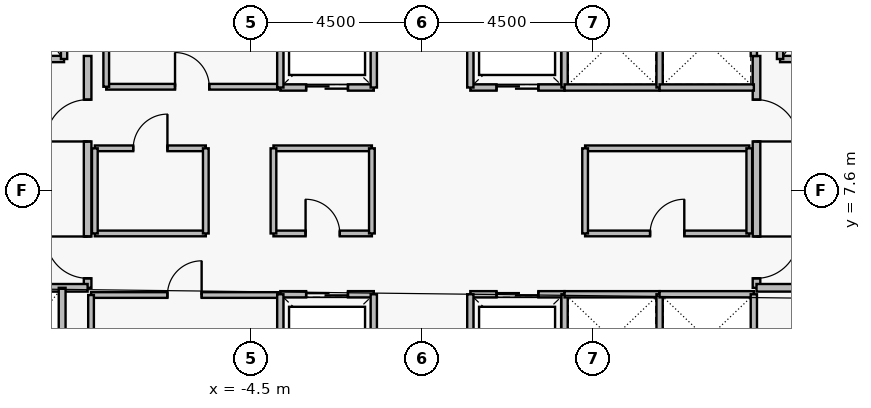
"""IFC4 building model, lengths in metres.
Left out: names, types, materials, properties, quantities, classifications, styles, units other than length and angle.
Written with IfcOpenShell. Run it as: python <this file> out.ifc"""

import sys

from ifc_helpers import new_model, si_unit, direction, frame, frame_2d, origin, place, context, subcontext, project, spatial, rectangle, extrude, element, fill, save


model = new_model("IFC4")
c1 = context("Model", 3, precision=1e-05, world=origin(), true_north=direction((0.0, 1.0)))
c2 = subcontext(c1, "Body", "Model", "MODEL_VIEW")
j1 = project(units=[si_unit("LENGTHUNIT", "METRE"), si_unit("PLANEANGLEUNIT", "RADIAN")], contexts=[c1])
p1 = place(None, origin())
s1 = spatial("IfcSite", under=j1, at=p1, CompositionType="ELEMENT")
p2 = place(p1, origin())
s2 = spatial("IfcBuilding", under=s1, at=p2, CompositionType="ELEMENT")
p3 = place(p2, frame((0.0, 0.0, 181.15)))
s3 = spatial("IfcBuildingStorey", under=s2, at=p3, CompositionType="ELEMENT", Elevation=181.15)
p4 = place(p3, frame((-8.8, 5.05, 0.0), z_axis=(0.0, 0.0, 1.0), x_axis=(0.0, 1.0, 0.0)))
e1 = element("IfcWall", 1, at=p4, inside=s3, PredefinedType="PARTITIONING", context=c2, shape_type="SweptSolid", body=[
    extrude(rectangle(XDim=6.1, YDim=0.2, at=frame_2d((3.05, 0.0))), origin(), (0.0, 0.0, 1.0), 3.53),
])
p5 = place(p4, frame((0.25, 0.0, 0.0)))
e2 = element("IfcOpeningElement", 2, at=p5, cuts=e1, PredefinedType="OPENING", context=c2, shape_type="SweptSolid", body=[
    extrude(rectangle(XDim=1.1, YDim=2.2, at=frame_2d((0.55, 1.1))), frame((0.0, 0.11, 0.0), z_axis=(0.0, -1.0, 0.0), x_axis=(1.0, 0.0, 0.0)), (0.0, 0.0, 1.0), 0.22),
])
p6 = place(p4, frame((3.85, 0.0, 0.0)))
e3 = element("IfcOpeningElement", 3, at=p6, cuts=e1, PredefinedType="OPENING", context=c2, shape_type="SweptSolid", body=[
    extrude(rectangle(XDim=1.1, YDim=2.2, at=frame_2d((0.55, 1.1))), frame((0.0, 0.11, 0.0), z_axis=(0.0, -1.0, 0.0), x_axis=(1.0, 0.0, 0.0)), (0.0, 0.0, 1.0), 0.22),
])
p7 = place(p3, frame((8.8, 11.15, 0.0), z_axis=(0.0, 0.0, 1.0), x_axis=(0.0, -1.0, 0.0)))
e4 = element("IfcWall", 4, at=p7, inside=s3, PredefinedType="PARTITIONING", context=c2, shape_type="SweptSolid", body=[
    extrude(rectangle(XDim=6.1, YDim=0.2, at=frame_2d((3.05, 0.0))), origin(), (0.0, 0.0, 1.0), 3.53),
])
p8 = place(p7, frame((1.15, 0.0, 0.0)))
e5 = element("IfcOpeningElement", 5, at=p8, cuts=e4, PredefinedType="OPENING", context=c2, shape_type="SweptSolid", body=[
    extrude(rectangle(XDim=1.1, YDim=2.2, at=frame_2d((0.55, 1.1))), frame((0.0, 0.11, 0.0), z_axis=(0.0, -1.0, 0.0), x_axis=(1.0, 0.0, 0.0)), (0.0, 0.0, 1.0), 0.22),
])
p9 = place(p7, frame((4.75, 0.0, 0.0)))
e6 = element("IfcOpeningElement", 6, at=p9, cuts=e4, PredefinedType="OPENING", context=c2, shape_type="SweptSolid", body=[
    extrude(rectangle(XDim=1.1, YDim=2.2, at=frame_2d((0.55, 1.1))), frame((0.0, 0.11, 0.0), z_axis=(0.0, -1.0, 0.0), x_axis=(1.0, 0.0, 0.0)), (0.0, 0.0, 1.0), 0.22),
])
p10 = place(p3, frame((-11.58, 11.07, 0.0), z_axis=(0.0, 0.0, 1.0), x_axis=(1.0, 0.0, 0.0)))
e7 = element("IfcWall", 7, at=p10, inside=s3, PredefinedType="PARTITIONING", context=c2, shape_type="SweptSolid", body=[
    extrude(rectangle(XDim=2.16, YDim=0.165, at=frame_2d((1.08, 0.0))), origin(), (0.0, 0.0, 1.0), 3.53),
])
p11 = place(p10, frame((0.53, 0.0, 0.0)))
e8 = element("IfcOpeningElement", 8, at=p11, cuts=e7, PredefinedType="OPENING", context=c2, shape_type="SweptSolid", body=[
    extrude(rectangle(XDim=1.15, YDim=2.25, at=frame_2d((0.575, 1.125))), frame((0.0, 0.093, 0.0), z_axis=(0.0, -1.0, 0.0), x_axis=(1.0, 0.0, 0.0)), (0.0, 0.0, 1.0), 0.185),
])
p12 = place(p3, frame((9.42, 11.07, 0.0), z_axis=(0.0, 0.0, 1.0), x_axis=(1.0, 0.0, 0.0)))
e9 = element("IfcWall", 9, at=p12, inside=s3, PredefinedType="PARTITIONING", context=c2, shape_type="SweptSolid", body=[
    extrude(rectangle(XDim=2.16, YDim=0.165, at=frame_2d((1.08, 0.0))), origin(), (0.0, 0.0, 1.0), 3.53),
])
p13 = place(p12, frame((0.53, 0.0, 0.0)))
e10 = element("IfcOpeningElement", 10, at=p13, cuts=e9, PredefinedType="OPENING", context=c2, shape_type="SweptSolid", body=[
    extrude(rectangle(XDim=1.15, YDim=2.25, at=frame_2d((0.575, 1.125))), frame((0.0, 0.093, 0.0), z_axis=(0.0, -1.0, 0.0), x_axis=(1.0, 0.0, 0.0)), (0.0, 0.0, 1.0), 0.185),
])
p14 = place(p3, frame((-3.73, 4.88, 0.0), z_axis=(0.0, 0.0, 1.0), x_axis=(1.0, 0.0, 0.0)))
e11 = element("IfcWall", 11, at=p14, inside=s3, PredefinedType="PARTITIONING", context=c2, shape_type="SweptSolid", body=[
    extrude(rectangle(XDim=2.46, YDim=0.165, at=frame_2d((1.23, 0.0))), origin(), (0.0, 0.0, 1.0), 3.53),
])
p15 = place(p14, frame((0.68, 0.0, 0.0)))
e12 = element("IfcOpeningElement", 12, at=p15, cuts=e11, PredefinedType="OPENING", context=c2, shape_type="SweptSolid", body=[
    extrude(rectangle(XDim=1.1, YDim=2.25, at=frame_2d((0.55, 1.125))), frame((0.0, 0.093, 0.0), z_axis=(0.0, -1.0, 0.0), x_axis=(1.0, 0.0, 0.0)), (0.0, 0.0, 1.0), 0.185),
])
p16 = place(p3, frame((1.27, 4.88, 0.0), z_axis=(0.0, 0.0, 1.0), x_axis=(1.0, 0.0, 0.0)))
e13 = element("IfcWall", 13, at=p16, inside=s3, PredefinedType="PARTITIONING", context=c2, shape_type="SweptSolid", body=[
    extrude(rectangle(XDim=2.48, YDim=0.165, at=frame_2d((1.24, 0.0))), origin(), (0.0, 0.0, 1.0), 3.53),
])
p17 = place(p16, frame((0.69, 0.0, 0.0)))
e14 = element("IfcOpeningElement", 14, at=p17, cuts=e13, PredefinedType="OPENING", context=c2, shape_type="SweptSolid", body=[
    extrude(rectangle(XDim=1.1, YDim=2.25, at=frame_2d((0.55, 1.125))), frame((0.0, 0.093, 0.0), z_axis=(0.0, -1.0, 0.0), x_axis=(1.0, 0.0, 0.0)), (0.0, 0.0, 1.0), 0.185),
])
p18 = place(p3, frame((-3.73, 10.32, 0.0), z_axis=(0.0, 0.0, 1.0), x_axis=(1.0, 0.0, 0.0)))
e15 = element("IfcWall", 15, at=p18, inside=s3, PredefinedType="PARTITIONING", context=c2, shape_type="SweptSolid", body=[
    extrude(rectangle(XDim=2.46, YDim=0.165, at=frame_2d((1.23, 0.0))), origin(), (0.0, 0.0, 1.0), 3.53),
])
p19 = place(p18, frame((0.68, 0.0, 0.0)))
e16 = element("IfcOpeningElement", 16, at=p19, cuts=e15, PredefinedType="OPENING", context=c2, shape_type="SweptSolid", body=[
    extrude(rectangle(XDim=1.1, YDim=2.25, at=frame_2d((0.55, 1.125))), frame((0.0, 0.093, 0.0), z_axis=(0.0, -1.0, 0.0), x_axis=(1.0, 0.0, 0.0)), (0.0, 0.0, 1.0), 0.185),
])
p20 = place(p3, frame((1.27, 10.32, 0.0), z_axis=(0.0, 0.0, 1.0), x_axis=(1.0, 0.0, 0.0)))
e17 = element("IfcWall", 17, at=p20, inside=s3, PredefinedType="PARTITIONING", context=c2, shape_type="SweptSolid", body=[
    extrude(rectangle(XDim=2.48, YDim=0.165, at=frame_2d((1.24, 0.0))), origin(), (0.0, 0.0, 1.0), 3.53),
])
p21 = place(p20, frame((0.69, 0.0, 0.0)))
e18 = element("IfcOpeningElement", 18, at=p21, cuts=e17, PredefinedType="OPENING", context=c2, shape_type="SweptSolid", body=[
    extrude(rectangle(XDim=1.1, YDim=2.25, at=frame_2d((0.55, 1.125))), frame((0.0, 0.093, 0.0), z_axis=(0.0, -1.0, 0.0), x_axis=(1.0, 0.0, 0.0)), (0.0, 0.0, 1.0), 0.185),
])
p22 = place(p3, frame((-8.71, 4.86, 0.0), z_axis=(0.0, 0.0, 1.0), x_axis=(1.0, 0.0, 0.0)))
e19 = element("IfcWall", 19, at=p22, inside=s3, PredefinedType="PARTITIONING", context=c2, shape_type="SweptSolid", body=[
    extrude(rectangle(XDim=4.92, YDim=0.15, at=frame_2d((2.46, 0.0))), origin(), (0.0, 0.0, 1.0), 3.53),
])
p23 = place(p22, frame((2.01, 0.0, 0.0)))
e20 = element("IfcOpeningElement", 20, at=p23, cuts=e19, PredefinedType="OPENING", context=c2, shape_type="SweptSolid", body=[
    extrude(rectangle(XDim=0.9, YDim=2.15, at=frame_2d((0.45, 1.075))), frame((0.0, 0.085, 0.0), z_axis=(0.0, -1.0, 0.0), x_axis=(1.0, 0.0, 0.0)), (0.0, 0.0, 1.0), 0.17),
])
p24 = place(p3, frame((-8.31, 10.34, 0.0), z_axis=(0.0, 0.0, 1.0), x_axis=(1.0, 0.0, 0.0)))
e21 = element("IfcWall", 21, at=p24, inside=s3, PredefinedType="PARTITIONING", context=c2, shape_type="SweptSolid", body=[
    extrude(rectangle(XDim=4.52, YDim=0.15, at=frame_2d((2.26, 0.0))), origin(), (0.0, 0.0, 1.0), 3.53),
])
p25 = place(p24, frame((1.81, 0.0, 0.0)))
e22 = element("IfcOpeningElement", 22, at=p25, cuts=e21, PredefinedType="OPENING", context=c2, shape_type="SweptSolid", body=[
    extrude(rectangle(XDim=0.9, YDim=2.15, at=frame_2d((0.45, 1.075))), frame((0.0, 0.085, 0.0), z_axis=(0.0, -1.0, 0.0), x_axis=(1.0, 0.0, 0.0)), (0.0, 0.0, 1.0), 0.17),
])
p26 = place(p3, frame((-8.61, 8.72, 0.0), z_axis=(0.0, 0.0, 1.0), x_axis=(1.0, 0.0, 0.0)))
e23 = element("IfcWall", 23, at=p26, inside=s3, PredefinedType="PARTITIONING", context=c2, shape_type="SweptSolid", body=[
    extrude(rectangle(XDim=2.92, YDim=0.15, at=frame_2d((1.46, 0.0))), origin(), (0.0, 0.0, 1.0), 3.53),
])
p27 = place(p26, frame((1.01, 0.0, 0.0)))
e24 = element("IfcOpeningElement", 24, at=p27, cuts=e23, PredefinedType="OPENING", context=c2, shape_type="SweptSolid", body=[
    extrude(rectangle(XDim=0.9, YDim=2.15, at=frame_2d((0.45, 1.075))), frame((0.0, 0.085, 0.0), z_axis=(0.0, -1.0, 0.0), x_axis=(1.0, 0.0, 0.0)), (0.0, 0.0, 1.0), 0.17),
])
p28 = place(p3, frame((-3.91, 6.48, 0.0), z_axis=(0.0, 0.0, 1.0), x_axis=(1.0, 0.0, 0.0)))
e25 = element("IfcWall", 25, at=p28, inside=s3, PredefinedType="PARTITIONING", context=c2, shape_type="SweptSolid", body=[
    extrude(rectangle(XDim=2.59, YDim=0.15, at=frame_2d((1.295, 0.0))), origin(), (0.0, 0.0, 1.0), 3.53),
])
p29 = place(p28, frame((0.845, 0.0, 0.0)))
e26 = element("IfcOpeningElement", 26, at=p29, cuts=e25, PredefinedType="OPENING", context=c2, shape_type="SweptSolid", body=[
    extrude(rectangle(XDim=0.9, YDim=2.15, at=frame_2d((0.45, 1.075))), frame((0.0, 0.085, 0.0), z_axis=(0.0, -1.0, 0.0), x_axis=(1.0, 0.0, 0.0)), (0.0, 0.0, 1.0), 0.17),
])
p30 = place(p3, frame((4.29, 6.48, 0.0), z_axis=(0.0, 0.0, 1.0), x_axis=(1.0, 0.0, 0.0)))
e27 = element("IfcWall", 27, at=p30, inside=s3, PredefinedType="PARTITIONING", context=c2, shape_type="SweptSolid", body=[
    extrude(rectangle(XDim=4.32, YDim=0.15, at=frame_2d((2.16, 0.0))), origin(), (0.0, 0.0, 1.0), 3.53),
])
p31 = place(p30, frame((1.71, 0.0, 0.0)))
e28 = element("IfcOpeningElement", 28, at=p31, cuts=e27, PredefinedType="OPENING", context=c2, shape_type="SweptSolid", body=[
    extrude(rectangle(XDim=0.9, YDim=2.15, at=frame_2d((0.45, 1.075))), frame((0.0, 0.085, 0.0), z_axis=(0.0, -1.0, 0.0), x_axis=(1.0, 0.0, 0.0)), (0.0, 0.0, 1.0), 0.17),
])
for number, where, z_axis, x_axis in (
    (29, (-11.65, 5.05, 0.0), (0.0, 0.0, 1.0), (1.0, 0.0, 0.0)),
    (30, (8.8, 5.05, 0.0), (0.0, 0.0, 1.0), (1.0, 0.0, 0.0)),
):
    element("IfcWall", number, at=place(p3, frame(where, z_axis=z_axis, x_axis=x_axis)), inside=s3, PredefinedType="PARTITIONING", context=c2, shape_type="SweptSolid", body=[
        extrude(rectangle(XDim=2.85, YDim=0.2, at=frame_2d((1.425, 0.0))), origin(), (0.0, 0.0, 1.0), 3.53),
    ])
for number, where, z_axis, x_axis in (
    (31, (-9.42, 11.07, 0.0), (0.0, 0.0, 1.0), (0.0, 1.0, 0.0)),
    (32, (9.42, 11.07, 0.0), (0.0, 0.0, 1.0), (0.0, 1.0, 0.0)),
):
    element("IfcWall", number, at=place(p3, frame(where, z_axis=z_axis, x_axis=x_axis)), inside=s3, PredefinedType="PARTITIONING", context=c2, shape_type="SweptSolid", body=[
        extrude(rectangle(XDim=2.96, YDim=0.165, at=frame_2d((1.48, 0.0))), origin(), (0.0, 0.0, 1.0), 3.53),
    ])
for number, where, z_axis, x_axis in (
    (33, (-3.73, 2.52, 0.0), (0.0, 0.0, 1.0), (0.0, 1.0, 0.0)),
    (34, (-1.27, 2.52, 0.0), (0.0, 0.0, 1.0), (0.0, 1.0, 0.0)),
    (35, (1.27, 2.52, 0.0), (0.0, 0.0, 1.0), (0.0, 1.0, 0.0)),
    (36, (3.75, 2.52, 0.0), (0.0, 0.0, 1.0), (0.0, 1.0, 0.0)),
    (37, (-3.73, 10.32, 0.0), (0.0, 0.0, 1.0), (0.0, 1.0, 0.0)),
    (38, (-1.27, 10.32, 0.0), (0.0, 0.0, 1.0), (0.0, 1.0, 0.0)),
    (39, (1.27, 10.32, 0.0), (0.0, 0.0, 1.0), (0.0, 1.0, 0.0)),
    (40, (3.75, 10.32, 0.0), (0.0, 0.0, 1.0), (0.0, 1.0, 0.0)),
):
    element("IfcWall", number, at=place(p3, frame(where, z_axis=z_axis, x_axis=x_axis)), inside=s3, PredefinedType="PARTITIONING", context=c2, shape_type="SweptSolid", body=[
        extrude(rectangle(XDim=2.36, YDim=0.165, at=frame_2d((1.18, 0.0))), origin(), (0.0, 0.0, 1.0), 3.53),
    ])
p32 = place(p3, frame((3.75, 4.88, 0.0), z_axis=(0.0, 0.0, 1.0), x_axis=(1.0, 0.0, 0.0)))
e41 = element("IfcWall", 41, at=p32, inside=s3, PredefinedType="PARTITIONING", context=c2, shape_type="SweptSolid", body=[
    extrude(rectangle(XDim=2.5, YDim=0.165, at=frame_2d((1.25, 0.0))), origin(), (0.0, 0.0, 1.0), 3.53),
])
p33 = place(p3, frame((6.25, 2.52, 0.0), z_axis=(0.0, 0.0, 1.0), x_axis=(0.0, 1.0, 0.0)))
e42 = element("IfcWall", 42, at=p33, inside=s3, PredefinedType="PARTITIONING", context=c2, shape_type="SweptSolid", body=[
    extrude(rectangle(XDim=2.36, YDim=0.165, at=frame_2d((1.18, 0.0))), origin(), (0.0, 0.0, 1.0), 3.53),
])
p34 = place(p3, frame((6.25, 4.88, 0.0), z_axis=(0.0, 0.0, 1.0), x_axis=(1.0, 0.0, 0.0)))
e43 = element("IfcWall", 43, at=p34, inside=s3, PredefinedType="PARTITIONING", context=c2, shape_type="SweptSolid", body=[
    extrude(rectangle(XDim=2.48, YDim=0.165, at=frame_2d((1.24, 0.0))), origin(), (0.0, 0.0, 1.0), 3.53),
])
p35 = place(p3, frame((8.73, 2.52, 0.0), z_axis=(0.0, 0.0, 1.0), x_axis=(0.0, 1.0, 0.0)))
e44 = element("IfcWall", 44, at=p35, inside=s3, PredefinedType="PARTITIONING", context=c2, shape_type="SweptSolid", body=[
    extrude(rectangle(XDim=2.36, YDim=0.165, at=frame_2d((1.18, 0.0))), origin(), (0.0, 0.0, 1.0), 3.53),
])
p36 = place(p3, frame((3.75, 10.32, 0.0), z_axis=(0.0, 0.0, 1.0), x_axis=(1.0, 0.0, 0.0)))
e45 = element("IfcWall", 45, at=p36, inside=s3, PredefinedType="PARTITIONING", context=c2, shape_type="SweptSolid", body=[
    extrude(rectangle(XDim=2.5, YDim=0.165, at=frame_2d((1.25, 0.0))), origin(), (0.0, 0.0, 1.0), 3.53),
])
p37 = place(p3, frame((6.25, 10.32, 0.0), z_axis=(0.0, 0.0, 1.0), x_axis=(0.0, 1.0, 0.0)))
e46 = element("IfcWall", 46, at=p37, inside=s3, PredefinedType="PARTITIONING", context=c2, shape_type="SweptSolid", body=[
    extrude(rectangle(XDim=2.36, YDim=0.165, at=frame_2d((1.18, 0.0))), origin(), (0.0, 0.0, 1.0), 3.53),
])
p38 = place(p3, frame((6.25, 10.32, 0.0), z_axis=(0.0, 0.0, 1.0), x_axis=(1.0, 0.0, 0.0)))
e47 = element("IfcWall", 47, at=p38, inside=s3, PredefinedType="PARTITIONING", context=c2, shape_type="SweptSolid", body=[
    extrude(rectangle(XDim=2.48, YDim=0.165, at=frame_2d((1.24, 0.0))), origin(), (0.0, 0.0, 1.0), 3.53),
])
p39 = place(p3, frame((8.73, 11.15, 0.0), z_axis=(0.0, 0.0, 1.0), x_axis=(0.0, 1.0, 0.0)))
e48 = element("IfcWall", 48, at=p39, inside=s3, PredefinedType="PARTITIONING", context=c2, shape_type="SweptSolid", body=[
    extrude(rectangle(XDim=1.53, YDim=0.165, at=frame_2d((0.765, 0.0))), origin(), (0.0, 0.0, 1.0), 3.53),
])
p40 = place(p3, frame((-8.71, 2.49, 0.0), z_axis=(0.0, 0.0, 1.0), x_axis=(0.0, 1.0, 0.0)))
e49 = element("IfcWall", 49, at=p40, inside=s3, PredefinedType="PARTITIONING", context=c2, shape_type="SweptSolid", body=[
    extrude(rectangle(XDim=2.37, YDim=0.15, at=frame_2d((1.185, 0.0))), origin(), (0.0, 0.0, 1.0), 3.53),
])
p41 = place(p3, frame((-8.31, 10.34, 0.0), z_axis=(0.0, 0.0, 1.0), x_axis=(0.0, 1.0, 0.0)))
e50 = element("IfcWall", 50, at=p41, inside=s3, PredefinedType="PARTITIONING", context=c2, shape_type="SweptSolid", body=[
    extrude(rectangle(XDim=2.52, YDim=0.15, at=frame_2d((1.26, 0.0))), origin(), (0.0, 0.0, 1.0), 3.53),
])
p42 = place(p3, frame((-9.47, 2.45, 0.0), z_axis=(0.0, 0.0, 1.0), x_axis=(0.0, 1.0, 0.0)))
e51 = element("IfcWall", 51, at=p42, inside=s3, PredefinedType="PARTITIONING", context=c2, shape_type="SweptSolid", body=[
    extrude(rectangle(XDim=2.6, YDim=0.18, at=frame_2d((1.3, 0.0))), origin(), (0.0, 0.0, 1.0), 3.53),
])
p43 = place(p3, frame((-8.61, 6.48, 0.0), z_axis=(0.0, 0.0, 1.0), x_axis=(1.0, 0.0, 0.0)))
e52 = element("IfcWall", 52, at=p43, inside=s3, PredefinedType="PARTITIONING", context=c2, shape_type="SweptSolid", body=[
    extrude(rectangle(XDim=2.92, YDim=0.15, at=frame_2d((1.46, 0.0))), origin(), (0.0, 0.0, 1.0), 3.53),
])
for number, where, z_axis, x_axis in (
    (53, (-8.61, 6.48, 0.0), (0.0, 0.0, 1.0), (0.0, 1.0, 0.0)),
    (54, (-5.69, 6.48, 0.0), (0.0, 0.0, 1.0), (0.0, 1.0, 0.0)),
):
    element("IfcWall", number, at=place(p3, frame(where, z_axis=z_axis, x_axis=x_axis)), inside=s3, PredefinedType="PARTITIONING", context=c2, shape_type="SweptSolid", body=[
        extrude(rectangle(XDim=2.24, YDim=0.15, at=frame_2d((1.12, 0.0))), origin(), (0.0, 0.0, 1.0), 3.53),
    ])
p44 = place(p3, frame((-3.91, 8.72, 0.0), z_axis=(0.0, 0.0, 1.0), x_axis=(1.0, 0.0, 0.0)))
e55 = element("IfcWall", 55, at=p44, inside=s3, PredefinedType="PARTITIONING", context=c2, shape_type="SweptSolid", body=[
    extrude(rectangle(XDim=2.59, YDim=0.15, at=frame_2d((1.295, 0.0))), origin(), (0.0, 0.0, 1.0), 3.53),
])
for number, where, z_axis, x_axis in (
    (56, (-3.91, 6.48, 0.0), (0.0, 0.0, 1.0), (0.0, 1.0, 0.0)),
    (57, (-1.32, 6.48, 0.0), (0.0, 0.0, 1.0), (0.0, 1.0, 0.0)),
):
    element("IfcWall", number, at=place(p3, frame(where, z_axis=z_axis, x_axis=x_axis)), inside=s3, PredefinedType="PARTITIONING", context=c2, shape_type="SweptSolid", body=[
        extrude(rectangle(XDim=2.24, YDim=0.15, at=frame_2d((1.12, 0.0))), origin(), (0.0, 0.0, 1.0), 3.53),
    ])
p45 = place(p3, frame((4.29, 8.72, 0.0), z_axis=(0.0, 0.0, 1.0), x_axis=(1.0, 0.0, 0.0)))
e58 = element("IfcWall", 58, at=p45, inside=s3, PredefinedType="PARTITIONING", context=c2, shape_type="SweptSolid", body=[
    extrude(rectangle(XDim=4.32, YDim=0.15, at=frame_2d((2.16, 0.0))), origin(), (0.0, 0.0, 1.0), 3.53),
])
for number, where, z_axis, x_axis in (
    (59, (4.29, 6.48, 0.0), (0.0, 0.0, 1.0), (0.0, 1.0, 0.0)),
    (60, (8.61, 6.48, 0.0), (0.0, 0.0, 1.0), (0.0, 1.0, 0.0)),
):
    element("IfcWall", number, at=place(p3, frame(where, z_axis=z_axis, x_axis=x_axis)), inside=s3, PredefinedType="PARTITIONING", context=c2, shape_type="SweptSolid", body=[
        extrude(rectangle(XDim=2.24, YDim=0.15, at=frame_2d((1.12, 0.0))), origin(), (0.0, 0.0, 1.0), 3.53),
    ])
p46 = place(p5, origin())
e61 = element("IfcDoor", 61, at=p46, inside=s3, OperationType="SINGLE_SWING_RIGHT", PredefinedType="DOOR", context=c2, shape_type="SweptSolid", body=[
    extrude(rectangle(XDim=1.1, YDim=2.2, at=frame_2d((0.55, 1.1))), frame((0.0, 0.025, 0.0), z_axis=(0.0, -1.0, 0.0), x_axis=(1.0, 0.0, 0.0)), (0.0, 0.0, 1.0), 0.05),
])
fill(e2, e61)
p47 = place(p6, origin())
e62 = element("IfcDoor", 62, at=p47, inside=s3, OperationType="SINGLE_SWING_LEFT", PredefinedType="DOOR", context=c2, shape_type="SweptSolid", body=[
    extrude(rectangle(XDim=1.1, YDim=2.2, at=frame_2d((0.55, 1.1))), frame((0.0, 0.025, 0.0), z_axis=(0.0, -1.0, 0.0), x_axis=(1.0, 0.0, 0.0)), (0.0, 0.0, 1.0), 0.05),
])
fill(e3, e62)
p48 = place(p8, origin())
e63 = element("IfcDoor", 63, at=p48, inside=s3, OperationType="SINGLE_SWING_RIGHT", PredefinedType="DOOR", context=c2, shape_type="SweptSolid", body=[
    extrude(rectangle(XDim=1.1, YDim=2.2, at=frame_2d((0.55, 1.1))), frame((0.0, 0.025, 0.0), z_axis=(0.0, -1.0, 0.0), x_axis=(1.0, 0.0, 0.0)), (0.0, 0.0, 1.0), 0.05),
])
fill(e5, e63)
p49 = place(p9, origin())
e64 = element("IfcDoor", 64, at=p49, inside=s3, OperationType="SINGLE_SWING_LEFT", PredefinedType="DOOR", context=c2, shape_type="SweptSolid", body=[
    extrude(rectangle(XDim=1.1, YDim=2.2, at=frame_2d((0.55, 1.1))), frame((0.0, 0.025, 0.0), z_axis=(0.0, -1.0, 0.0), x_axis=(1.0, 0.0, 0.0)), (0.0, 0.0, 1.0), 0.05),
])
fill(e6, e64)
p50 = place(p15, origin())
e65 = element("IfcDoor", 65, at=p50, inside=s3, OperationType="SLIDING_TO_LEFT", PredefinedType="DOOR", context=c2, shape_type="SweptSolid", body=[
    extrude(rectangle(XDim=1.1, YDim=2.25, at=frame_2d((0.55, 1.125))), frame((0.0, 0.025, 0.0), z_axis=(0.0, -1.0, 0.0), x_axis=(1.0, 0.0, 0.0)), (0.0, 0.0, 1.0), 0.05),
])
fill(e12, e65)
p51 = place(p17, origin())
e66 = element("IfcDoor", 66, at=p51, inside=s3, OperationType="SLIDING_TO_LEFT", PredefinedType="DOOR", context=c2, shape_type="SweptSolid", body=[
    extrude(rectangle(XDim=1.1, YDim=2.25, at=frame_2d((0.55, 1.125))), frame((0.0, 0.025, 0.0), z_axis=(0.0, -1.0, 0.0), x_axis=(1.0, 0.0, 0.0)), (0.0, 0.0, 1.0), 0.05),
])
fill(e14, e66)
p52 = place(p19, origin())
e67 = element("IfcDoor", 67, at=p52, inside=s3, OperationType="SLIDING_TO_LEFT", PredefinedType="DOOR", context=c2, shape_type="SweptSolid", body=[
    extrude(rectangle(XDim=1.1, YDim=2.25, at=frame_2d((0.55, 1.125))), frame((0.0, 0.025, 0.0), z_axis=(0.0, -1.0, 0.0), x_axis=(1.0, 0.0, 0.0)), (0.0, 0.0, 1.0), 0.05),
])
fill(e16, e67)
p53 = place(p21, origin())
e68 = element("IfcDoor", 68, at=p53, inside=s3, OperationType="SLIDING_TO_LEFT", PredefinedType="DOOR", context=c2, shape_type="SweptSolid", body=[
    extrude(rectangle(XDim=1.1, YDim=2.25, at=frame_2d((0.55, 1.125))), frame((0.0, 0.025, 0.0), z_axis=(0.0, -1.0, 0.0), x_axis=(1.0, 0.0, 0.0)), (0.0, 0.0, 1.0), 0.05),
])
fill(e18, e68)
p54 = place(p23, origin())
e69 = element("IfcDoor", 69, at=p54, inside=s3, OperationType="SINGLE_SWING_RIGHT", PredefinedType="DOOR", context=c2, shape_type="SweptSolid", body=[
    extrude(rectangle(XDim=0.9, YDim=2.15, at=frame_2d((0.45, 1.075))), frame((0.0, 0.025, 0.0), z_axis=(0.0, -1.0, 0.0), x_axis=(1.0, 0.0, 0.0)), (0.0, 0.0, 1.0), 0.05),
])
fill(e20, e69)
p55 = place(p25, origin())
e70 = element("IfcDoor", 70, at=p55, inside=s3, OperationType="SINGLE_SWING_LEFT", PredefinedType="DOOR", context=c2, shape_type="SweptSolid", body=[
    extrude(rectangle(XDim=0.9, YDim=2.15, at=frame_2d((0.45, 1.075))), frame((0.0, 0.025, 0.0), z_axis=(0.0, -1.0, 0.0), x_axis=(1.0, 0.0, 0.0)), (0.0, 0.0, 1.0), 0.05),
])
fill(e22, e70)
p56 = place(p27, origin())
e71 = element("IfcDoor", 71, at=p56, inside=s3, OperationType="SINGLE_SWING_RIGHT", PredefinedType="DOOR", context=c2, shape_type="SweptSolid", body=[
    extrude(rectangle(XDim=0.9, YDim=2.15, at=frame_2d((0.45, 1.075))), frame((0.0, 0.025, 0.0), z_axis=(0.0, -1.0, 0.0), x_axis=(1.0, 0.0, 0.0)), (0.0, 0.0, 1.0), 0.05),
])
fill(e24, e71)
p57 = place(p29, origin())
e72 = element("IfcDoor", 72, at=p57, inside=s3, OperationType="SINGLE_SWING_LEFT", PredefinedType="DOOR", context=c2, shape_type="SweptSolid", body=[
    extrude(rectangle(XDim=0.9, YDim=2.15, at=frame_2d((0.45, 1.075))), frame((0.0, 0.025, 0.0), z_axis=(0.0, -1.0, 0.0), x_axis=(1.0, 0.0, 0.0)), (0.0, 0.0, 1.0), 0.05),
])
fill(e26, e72)
p58 = place(p31, origin())
e73 = element("IfcDoor", 73, at=p58, inside=s3, OperationType="SINGLE_SWING_RIGHT", PredefinedType="DOOR", context=c2, shape_type="SweptSolid", body=[
    extrude(rectangle(XDim=0.9, YDim=2.15, at=frame_2d((0.45, 1.075))), frame((0.0, 0.025, 0.0), z_axis=(0.0, -1.0, 0.0), x_axis=(1.0, 0.0, 0.0)), (0.0, 0.0, 1.0), 0.05),
])
fill(e28, e73)
save(model, sys.argv[1])
